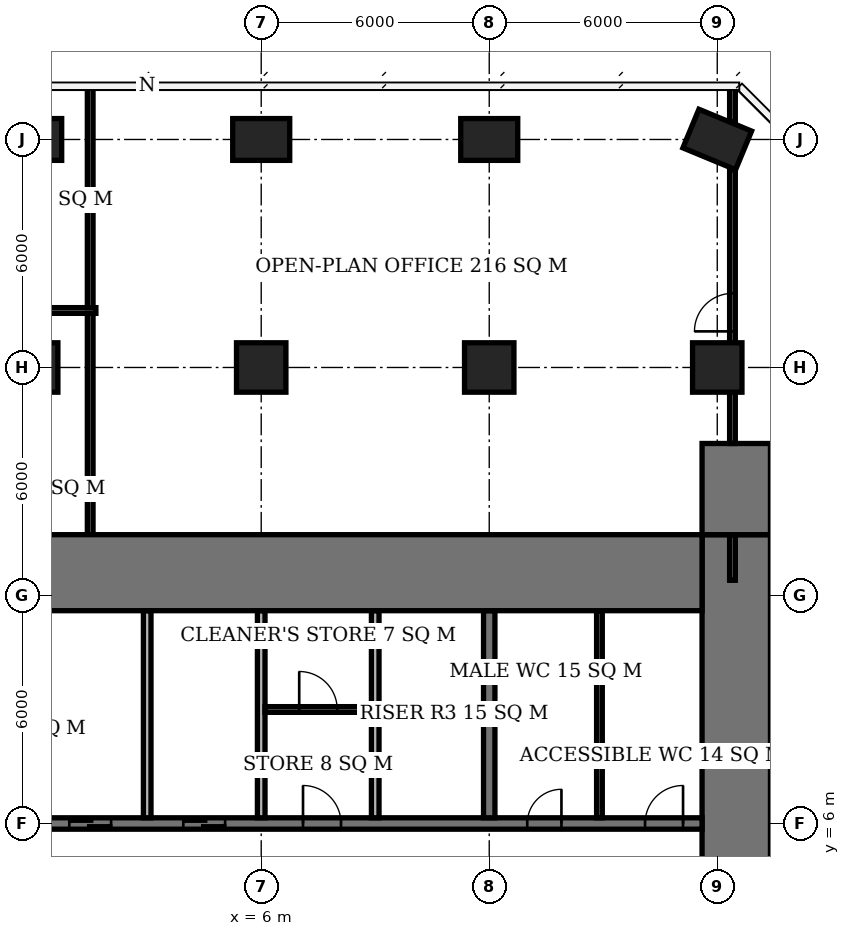
"""IFC4 building model, lengths in metres.
Left out: names, types, materials, properties, quantities, classifications, styles, units other than length and angle.
Written with IfcOpenShell. Run it as: python <this file> out.ifc"""

import sys

from ifc_helpers import new_model, si_unit, direction, frame, frame_2d, origin, origin_2d, place, context, subcontext, project, spatial, rectangle, extrude, element, fill, save


model = new_model("IFC4")
c1 = context("Model", 3, precision=1e-05, world=origin(), true_north=direction((0.0, 1.0)))
c2 = subcontext(c1, "Body", "Model", "MODEL_VIEW")
j1 = project(units=[si_unit("LENGTHUNIT", "METRE"), si_unit("PLANEANGLEUNIT", "RADIAN")], contexts=[c1])
p1 = place(None, origin())
s1 = spatial("IfcSite", under=j1, at=p1, CompositionType="ELEMENT")
p2 = place(p1, origin())
s2 = spatial("IfcBuilding", under=s1, at=p2, CompositionType="ELEMENT")
p3 = place(p2, frame((0.0, 0.0, 227.9)))
s3 = spatial("IfcBuildingStorey", under=s2, at=p3, CompositionType="ELEMENT", Elevation=227.9)
p4 = place(p3, frame((0.0, 18.0, 0.0), z_axis=(0.0, 0.0, 1.0), x_axis=(1.0, 0.0, 0.0)))
e1 = element("IfcColumn", 1, at=p4, inside=s3, PredefinedType="COLUMN", context=c2, shape_type="SweptSolid", body=[
    extrude(rectangle(XDim=1.3, YDim=1.3, at=origin_2d()), origin(), (0.0, 0.0, 1.0), 3.9),
])
p5 = place(p3, frame((0.0, 24.0, 0.0), z_axis=(0.0, 0.0, 1.0), x_axis=(1.0, 0.0, 0.0)))
e2 = element("IfcColumn", 2, at=p5, inside=s3, PredefinedType="COLUMN", context=c2, shape_type="SweptSolid", body=[
    extrude(rectangle(XDim=1.5, YDim=1.1, at=origin_2d()), origin(), (0.0, 0.0, 1.0), 3.9),
])
p6 = place(p3, frame((6.0, 18.0, 0.0), z_axis=(0.0, 0.0, 1.0), x_axis=(1.0, 0.0, 0.0)))
e3 = element("IfcColumn", 3, at=p6, inside=s3, PredefinedType="COLUMN", context=c2, shape_type="SweptSolid", body=[
    extrude(rectangle(XDim=1.3, YDim=1.3, at=origin_2d()), origin(), (0.0, 0.0, 1.0), 3.9),
])
p7 = place(p3, frame((6.0, 24.0, 0.0), z_axis=(0.0, 0.0, 1.0), x_axis=(1.0, 0.0, 0.0)))
e4 = element("IfcColumn", 4, at=p7, inside=s3, PredefinedType="COLUMN", context=c2, shape_type="SweptSolid", body=[
    extrude(rectangle(XDim=1.5, YDim=1.1, at=origin_2d()), origin(), (0.0, 0.0, 1.0), 3.9),
])
p8 = place(p3, frame((12.0, 18.0, 0.0), z_axis=(0.0, 0.0, 1.0), x_axis=(1.0, 0.0, 0.0)))
e5 = element("IfcColumn", 5, at=p8, inside=s3, PredefinedType="COLUMN", context=c2, shape_type="SweptSolid", body=[
    extrude(rectangle(XDim=1.3, YDim=1.3, at=origin_2d()), origin(), (0.0, 0.0, 1.0), 3.9),
])
p9 = place(p3, frame((12.0, 24.0, 0.0), z_axis=(0.0, 0.0, 1.0), x_axis=(1.0, 0.0, 0.0)))
e6 = element("IfcColumn", 6, at=p9, inside=s3, PredefinedType="COLUMN", context=c2, shape_type="SweptSolid", body=[
    extrude(rectangle(XDim=1.5, YDim=1.1, at=origin_2d()), origin(), (0.0, 0.0, 1.0), 3.9),
])
p10 = place(p3, frame((18.0, 18.0, 0.0), z_axis=(0.0, 0.0, 1.0), x_axis=(1.0, 0.0, 0.0)))
e7 = element("IfcColumn", 7, at=p10, inside=s3, PredefinedType="COLUMN", context=c2, shape_type="SweptSolid", body=[
    extrude(rectangle(XDim=1.3, YDim=1.3, at=origin_2d()), origin(), (0.0, 0.0, 1.0), 3.9),
])
p11 = place(p3, frame((18.0, 24.0, 0.0), z_axis=(0.0, 0.0, 1.0), x_axis=(0.923879532511, -0.382683432365, 0.0)))
e8 = element("IfcColumn", 8, at=p11, inside=s3, PredefinedType="COLUMN", context=c2, shape_type="SweptSolid", body=[
    extrude(rectangle(XDim=1.5, YDim=1.1, at=origin_2d()), origin(), (0.0, 0.0, 1.0), 3.9),
])
p12 = place(p3, frame((-5.6, 12.6, 0.0), z_axis=(0.0, 0.0, 1.0), x_axis=(1.0, 0.0, 0.0)))
e9 = element("IfcWall", 9, at=p12, inside=s3, PredefinedType="SHEAR", context=c2, shape_type="SweptSolid", body=[
    extrude(rectangle(XDim=23.2, YDim=2.0, at=frame_2d((11.6, 0.0))), origin(), (0.0, 0.0, 1.0), 3.9),
])
p13 = place(p3, frame((18.5, -7.6, 0.0), z_axis=(0.0, 0.0, 1.0), x_axis=(0.0, 1.0, 0.0)))
e10 = element("IfcWall", 10, at=p13, inside=s3, PredefinedType="SHEAR", context=c2, shape_type="SweptSolid", body=[
    extrude(rectangle(XDim=21.2, YDim=1.8, at=frame_2d((10.6, 0.0))), origin(), (0.0, 0.0, 1.0), 3.9),
])
p14 = place(p13, frame((9.2, 0.0, 0.0)))
e11 = element("IfcOpeningElement", 11, at=p14, cuts=e10, PredefinedType="OPENING", context=c2, shape_type="SweptSolid", body=[
    extrude(rectangle(XDim=1.8, YDim=2.4, at=frame_2d((0.9, 1.2))), frame((0.0, 0.91, 0.0), z_axis=(0.0, -1.0, 0.0), x_axis=(1.0, 0.0, 0.0)), (0.0, 0.0, 1.0), 1.82),
])
p15 = place(p3, frame((18.5, 13.6, 0.0), z_axis=(0.0, 0.0, 1.0), x_axis=(0.0, 1.0, 0.0)))
e12 = element("IfcWall", 12, at=p15, inside=s3, PredefinedType="SHEAR", context=c2, shape_type="SweptSolid", body=[
    extrude(rectangle(XDim=2.4, YDim=1.8, at=frame_2d((1.2, 0.0))), origin(), (0.0, 0.0, 1.0), 3.9),
])
p16 = place(p3, frame((-0.15, 6.0, 0.0), z_axis=(0.0, 0.0, 1.0), x_axis=(1.0, 0.0, 0.0)))
e13 = element("IfcWall", 13, at=p16, inside=s3, PredefinedType="SHEAR", context=c2, shape_type="SweptSolid", body=[
    extrude(rectangle(XDim=17.75, YDim=0.3, at=frame_2d((8.875, 0.0))), origin(), (0.0, 0.0, 1.0), 3.9),
])
p17 = place(p16, frame((13.15, 0.0, 0.0)))
e14 = element("IfcOpeningElement", 14, at=p17, cuts=e13, PredefinedType="OPENING", context=c2, shape_type="SweptSolid", body=[
    extrude(rectangle(XDim=0.9, YDim=2.1, at=frame_2d((0.45, 1.05))), frame((0.0, 0.16, 0.0), z_axis=(0.0, -1.0, 0.0), x_axis=(1.0, 0.0, 0.0)), (0.0, 0.0, 1.0), 0.32),
])
p18 = place(p16, frame((16.25, 0.0, 0.0)))
e15 = element("IfcOpeningElement", 15, at=p18, cuts=e13, PredefinedType="OPENING", context=c2, shape_type="SweptSolid", body=[
    extrude(rectangle(XDim=1.0, YDim=2.1, at=frame_2d((0.5, 1.05))), frame((0.0, 0.16, 0.0), z_axis=(0.0, -1.0, 0.0), x_axis=(1.0, 0.0, 0.0)), (0.0, 0.0, 1.0), 0.32),
])
p19 = place(p16, frame((7.25, 0.0, 0.0)))
e16 = element("IfcOpeningElement", 16, at=p19, cuts=e13, PredefinedType="OPENING", context=c2, shape_type="SweptSolid", body=[
    extrude(rectangle(XDim=1.0, YDim=2.1, at=frame_2d((0.5, 1.05))), frame((0.0, 0.16, 0.0), z_axis=(0.0, -1.0, 0.0), x_axis=(1.0, 0.0, 0.0)), (0.0, 0.0, 1.0), 0.32),
])
p20 = place(p16, frame((1.1, 0.0, 0.0)))
e17 = element("IfcOpeningElement", 17, at=p20, cuts=e13, PredefinedType="OPENING", context=c2, shape_type="SweptSolid", body=[
    extrude(rectangle(XDim=1.1, YDim=2.1, at=frame_2d((0.55, 1.05))), frame((0.0, 0.16, 0.0), z_axis=(0.0, -1.0, 0.0), x_axis=(1.0, 0.0, 0.0)), (0.0, 0.0, 1.0), 0.32),
])
p21 = place(p16, frame((4.1, 0.0, 0.0)))
e18 = element("IfcOpeningElement", 18, at=p21, cuts=e13, PredefinedType="OPENING", context=c2, shape_type="SweptSolid", body=[
    extrude(rectangle(XDim=1.1, YDim=2.1, at=frame_2d((0.55, 1.05))), frame((0.0, 0.16, 0.0), z_axis=(0.0, -1.0, 0.0), x_axis=(1.0, 0.0, 0.0)), (0.0, 0.0, 1.0), 0.32),
])
p22 = place(p3, frame((12.0, 6.15, 0.0), z_axis=(0.0, 0.0, 1.0), x_axis=(0.0, 1.0, 0.0)))
e19 = element("IfcWall", 19, at=p22, inside=s3, PredefinedType="SHEAR", context=c2, shape_type="SweptSolid", body=[
    extrude(rectangle(XDim=5.45, YDim=0.3, at=frame_2d((2.725, 0.0))), origin(), (0.0, 0.0, 1.0), 3.9),
])
for number, where, z_axis, x_axis in (
    (20, (3.0, 6.15, 0.0), (0.0, 0.0, 1.0), (0.0, 1.0, 0.0)),
    (21, (6.0, 6.15, 0.0), (0.0, 0.0, 1.0), (0.0, 1.0, 0.0)),
    (22, (9.0, 6.15, 0.0), (0.0, 0.0, 1.0), (0.0, 1.0, 0.0)),
):
    element("IfcWall", number, at=place(p3, frame(where, z_axis=z_axis, x_axis=x_axis)), inside=s3, PredefinedType="SOLIDWALL", context=c2, shape_type="SweptSolid", body=[
        extrude(rectangle(XDim=5.45, YDim=0.2, at=frame_2d((2.725, 0.0))), origin(), (0.0, 0.0, 1.0), 3.9),
    ])
p23 = place(p3, frame((14.9, 6.15, 0.0), z_axis=(0.0, 0.0, 1.0), x_axis=(0.0, 1.0, 0.0)))
e23 = element("IfcWall", 23, at=p23, inside=s3, PredefinedType="PLUMBINGWALL", context=c2, shape_type="SweptSolid", body=[
    extrude(rectangle(XDim=5.45, YDim=0.15, at=frame_2d((2.725, 0.0))), origin(), (0.0, 0.0, 1.0), 3.65),
])
p24 = place(p3, frame((6.1, 9.0, 0.0), z_axis=(0.0, 0.0, 1.0), x_axis=(1.0, 0.0, 0.0)))
e24 = element("IfcWall", 24, at=p24, inside=s3, PredefinedType="PARTITIONING", context=c2, shape_type="SweptSolid", body=[
    extrude(rectangle(XDim=2.8, YDim=0.15, at=frame_2d((1.4, 0.0))), origin(), (0.0, 0.0, 1.0), 3.65),
])
p25 = place(p24, frame((0.9, 0.0, 0.0)))
e25 = element("IfcOpeningElement", 25, at=p25, cuts=e24, PredefinedType="OPENING", context=c2, shape_type="SweptSolid", body=[
    extrude(rectangle(XDim=1.0, YDim=2.1, at=frame_2d((0.5, 1.05))), frame((0.0, 0.085, 0.0), z_axis=(0.0, -1.0, 0.0), x_axis=(1.0, 0.0, 0.0)), (0.0, 0.0, 1.0), 0.17),
])
p26 = place(p3, frame((-6.325, 19.5, 0.0), z_axis=(0.0, 0.0, 1.0), x_axis=(1.0, 0.0, 0.0)))
e26 = element("IfcWall", 26, at=p26, inside=s3, PredefinedType="PARTITIONING", context=c2, shape_type="SweptSolid", body=[
    extrude(rectangle(XDim=7.975, YDim=0.15, at=frame_2d((3.987, 0.0))), origin(), (0.0, 0.0, 1.0), 3.65),
])
p27 = place(p3, frame((1.5, 12.4, 0.0), z_axis=(0.0, 0.0, 1.0), x_axis=(0.0, 1.0, 0.0)))
e27 = element("IfcWall", 27, at=p27, inside=s3, PredefinedType="PARTITIONING", context=c2, shape_type="SweptSolid", body=[
    extrude(rectangle(XDim=7.025, YDim=0.15, at=frame_2d((3.513, 0.0))), origin(), (0.0, 0.0, 1.0), 3.65),
])
p28 = place(p3, frame((1.5, 19.575, 0.0), z_axis=(0.0, 0.0, 1.0), x_axis=(0.0, 1.0, 0.0)))
e28 = element("IfcWall", 28, at=p28, inside=s3, PredefinedType="PARTITIONING", context=c2, shape_type="SweptSolid", body=[
    extrude(rectangle(XDim=5.825, YDim=0.15, at=frame_2d((2.913, 0.0))), origin(), (0.0, 0.0, 1.0), 3.65),
])
p29 = place(p3, frame((18.4, 12.4, 0.0), z_axis=(0.0, 0.0, 1.0), x_axis=(0.0, 1.0, 0.0)))
e29 = element("IfcWall", 29, at=p29, inside=s3, PredefinedType="PARTITIONING", context=c2, shape_type="SweptSolid", body=[
    extrude(rectangle(XDim=1.2, YDim=0.15, at=frame_2d((0.6, 0.0))), origin(), (0.0, 0.0, 1.0), 3.65),
])
p30 = place(p3, frame((18.4, 16.0, 0.0), z_axis=(0.0, 0.0, 1.0), x_axis=(0.0, 1.0, 0.0)))
e30 = element("IfcWall", 30, at=p30, inside=s3, PredefinedType="PARTITIONING", context=c2, shape_type="SweptSolid", body=[
    extrude(rectangle(XDim=1.35, YDim=0.15, at=frame_2d((0.675, 0.0))), origin(), (0.0, 0.0, 1.0), 3.65),
])
p31 = place(p3, frame((18.4, 18.65, 0.0), z_axis=(0.0, 0.0, 1.0), x_axis=(0.0, 1.0, 0.0)))
e31 = element("IfcWall", 31, at=p31, inside=s3, PredefinedType="PARTITIONING", context=c2, shape_type="SweptSolid", body=[
    extrude(rectangle(XDim=4.558, YDim=0.15, at=frame_2d((2.279, 0.0))), origin(), (0.0, 0.0, 1.0), 3.65),
])
p32 = place(p31, frame((0.3, 0.0, 0.0)))
e32 = element("IfcOpeningElement", 32, at=p32, cuts=e31, PredefinedType="OPENING", context=c2, shape_type="SweptSolid", body=[
    extrude(rectangle(XDim=1.0, YDim=2.1, at=frame_2d((0.5, 1.05))), frame((0.0, 0.085, 0.0), z_axis=(0.0, -1.0, 0.0), x_axis=(1.0, 0.0, 0.0)), (0.0, 0.0, 1.0), 0.17),
])
p33 = place(p3, frame((18.4, 24.461, 0.0), z_axis=(0.0, 0.0, 1.0), x_axis=(0.0, 1.0, 0.0)))
e33 = element("IfcWall", 33, at=p33, inside=s3, PredefinedType="PARTITIONING", context=c2, shape_type="SweptSolid", body=[
    extrude(rectangle(XDim=0.939, YDim=0.15, at=frame_2d((0.47, 0.0))), origin(), (0.0, 0.0, 1.0), 3.65),
])
p34 = place(p17, origin())
e34 = element("IfcDoor", 34, at=p34, inside=s3, OperationType="SINGLE_SWING_RIGHT", PredefinedType="DOOR", context=c2, shape_type="SweptSolid", body=[
    extrude(rectangle(XDim=0.9, YDim=2.1, at=frame_2d((0.45, 1.05))), frame((0.0, 0.025, 0.0), z_axis=(0.0, -1.0, 0.0), x_axis=(1.0, 0.0, 0.0)), (0.0, 0.0, 1.0), 0.05),
])
fill(e14, e34)
p35 = place(p18, origin())
e35 = element("IfcDoor", 35, at=p35, inside=s3, OperationType="SINGLE_SWING_RIGHT", PredefinedType="DOOR", context=c2, shape_type="SweptSolid", body=[
    extrude(rectangle(XDim=1.0, YDim=2.1, at=frame_2d((0.5, 1.05))), frame((0.0, 0.025, 0.0), z_axis=(0.0, -1.0, 0.0), x_axis=(1.0, 0.0, 0.0)), (0.0, 0.0, 1.0), 0.05),
])
fill(e15, e35)
p36 = place(p25, origin())
e36 = element("IfcDoor", 36, at=p36, inside=s3, OperationType="SINGLE_SWING_LEFT", PredefinedType="DOOR", context=c2, shape_type="SweptSolid", body=[
    extrude(rectangle(XDim=1.0, YDim=2.1, at=frame_2d((0.5, 1.05))), frame((0.0, 0.025, 0.0), z_axis=(0.0, -1.0, 0.0), x_axis=(1.0, 0.0, 0.0)), (0.0, 0.0, 1.0), 0.05),
])
fill(e25, e36)
p37 = place(p19, origin())
e37 = element("IfcDoor", 37, at=p37, inside=s3, OperationType="SINGLE_SWING_LEFT", PredefinedType="DOOR", context=c2, shape_type="SweptSolid", body=[
    extrude(rectangle(XDim=1.0, YDim=2.1, at=frame_2d((0.5, 1.05))), frame((0.0, 0.025, 0.0), z_axis=(0.0, -1.0, 0.0), x_axis=(1.0, 0.0, 0.0)), (0.0, 0.0, 1.0), 0.05),
])
fill(e16, e37)
p38 = place(p20, origin())
e38 = element("IfcDoor", 38, at=p38, inside=s3, OperationType="DOUBLE_DOOR_SLIDING", PredefinedType="USERDEFINED", context=c2, shape_type="SweptSolid", body=[
    extrude(rectangle(XDim=1.1, YDim=2.1, at=frame_2d((0.55, 1.05))), frame((0.0, 0.025, 0.0), z_axis=(0.0, -1.0, 0.0), x_axis=(1.0, 0.0, 0.0)), (0.0, 0.0, 1.0), 0.05),
])
fill(e17, e38)
p39 = place(p21, origin())
e39 = element("IfcDoor", 39, at=p39, inside=s3, OperationType="DOUBLE_DOOR_SLIDING", PredefinedType="USERDEFINED", context=c2, shape_type="SweptSolid", body=[
    extrude(rectangle(XDim=1.1, YDim=2.1, at=frame_2d((0.55, 1.05))), frame((0.0, 0.025, 0.0), z_axis=(0.0, -1.0, 0.0), x_axis=(1.0, 0.0, 0.0)), (0.0, 0.0, 1.0), 0.05),
])
fill(e18, e39)
p40 = place(p32, origin())
e40 = element("IfcDoor", 40, at=p40, inside=s3, OperationType="SINGLE_SWING_LEFT", PredefinedType="DOOR", context=c2, shape_type="SweptSolid", body=[
    extrude(rectangle(XDim=1.0, YDim=2.1, at=frame_2d((0.5, 1.05))), frame((0.0, 0.025, 0.0), z_axis=(0.0, -1.0, 0.0), x_axis=(1.0, 0.0, 0.0)), (0.0, 0.0, 1.0), 0.05),
])
fill(e32, e40)
save(model, sys.argv[1])
